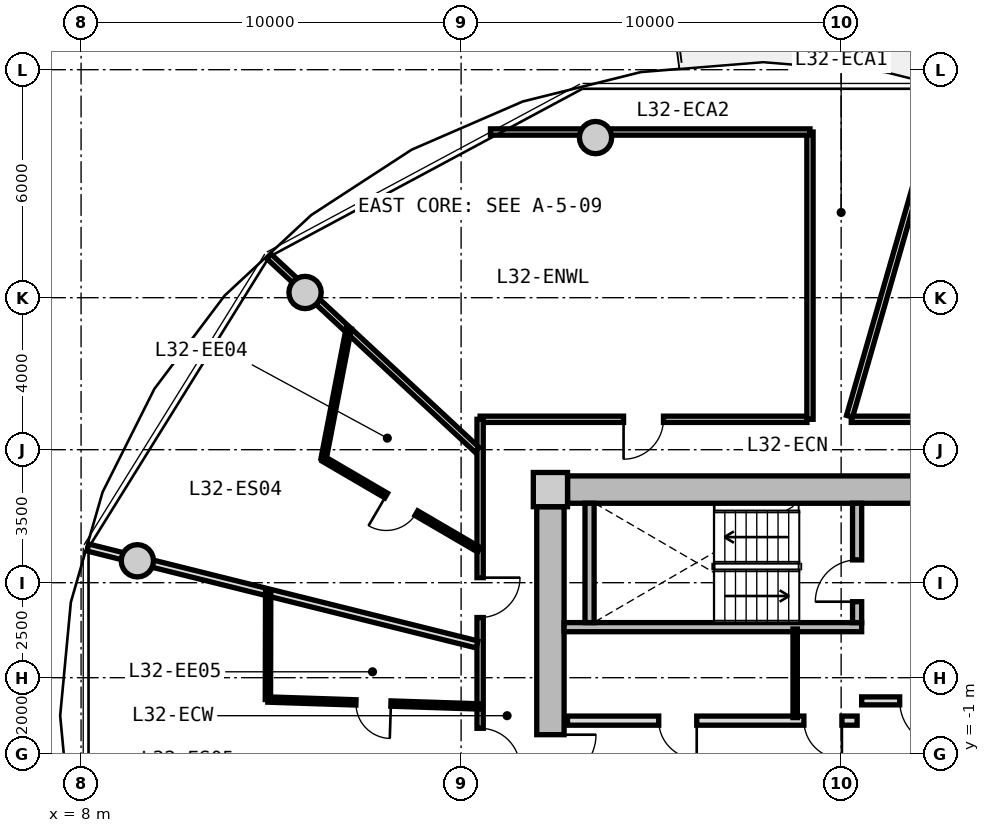
"""IFC4 building model, lengths in metres.
Left out: names, types, materials, properties, quantities, classifications, styles, units other than length and angle.
Written with IfcOpenShell. Run it as: python <this file> out.ifc"""

import sys

from ifc_helpers import new_model, si_unit, direction, frame, frame_2d, origin, origin_2d, place, context, subcontext, project, spatial, rectangle, circle, extrude, source, transform, mapped, element, fill, save


model = new_model("IFC4")
c1 = context("Model", 3, precision=1e-05, world=origin(), true_north=direction((0.0, 1.0)))
c2 = subcontext(c1, "Body", "Model", "MODEL_VIEW")
j1 = project(units=[si_unit("LENGTHUNIT", "METRE"), si_unit("PLANEANGLEUNIT", "RADIAN")], contexts=[c1])
p1 = place(None, origin())
s1 = spatial("IfcSite", under=j1, at=p1, CompositionType="ELEMENT")
p2 = place(p1, origin())
s2 = spatial("IfcBuilding", under=s1, at=p2, CompositionType="ELEMENT")
p3 = place(p2, frame((0.0, 0.0, 105.4)))
s3 = spatial("IfcBuildingStorey", under=s2, at=p3, CompositionType="ELEMENT", Elevation=105.4)
m1 = source(origin(), c2, "Body", "SweptSolid", [
    extrude(rectangle(XDim=0.9, YDim=0.9, at=origin_2d()), origin(), (0.0, 0.0, 1.0), 3.05),
])
p4 = place(p3, frame((20.35, 5.95, 0.0), z_axis=(0.0, 0.0, 1.0), x_axis=(1.0, 0.0, 0.0)))
e1 = element("IfcColumn", 1, at=p4, inside=s3, PredefinedType="COLUMN", context=c2, shape_type="MappedRepresentation", body=[
    mapped(m1, transform((0.0, 0.0, 0.0), x_axis=(1.0, 0.0, 0.0), y_axis=(0.0, 1.0, 0.0), z_axis=(0.0, 0.0, 1.0), scale=1.0)),
])
m2 = source(origin(), c2, "Body", "SweptSolid", [
    extrude(rectangle(XDim=14.4, YDim=0.72, at=frame_2d((7.2, 0.0))), origin(), (0.0, 0.0, 1.0), 2.79),
])
p5 = place(p3, frame((20.8, 5.95, 0.0), z_axis=(0.0, 0.0, 1.0), x_axis=(1.0, 0.0, 0.0)))
e2 = element("IfcWall", 2, at=p5, inside=s3, PredefinedType="SHEAR", context=c2, shape_type="MappedRepresentation", body=[
    mapped(m2, transform((0.0, 0.0, 0.0), x_axis=(1.0, 0.0, 0.0), y_axis=(0.0, 1.0, 0.0), z_axis=(0.0, 0.0, 1.0), scale=1.0)),
])
m3 = source(origin(), c2, "Body", "SweptSolid", [
    extrude(rectangle(XDim=11.0, YDim=0.72, at=frame_2d((5.5, 0.0))), origin(), (0.0, 0.0, 1.0), 2.79),
])
p6 = place(p3, frame((20.35, -5.5, 0.0), z_axis=(0.0, 0.0, 1.0), x_axis=(0.0, 1.0, 0.0)))
e3 = element("IfcWall", 3, at=p6, inside=s3, PredefinedType="SHEAR", context=c2, shape_type="MappedRepresentation", body=[
    mapped(m3, transform((0.0, 0.0, 0.0), x_axis=(1.0, 0.0, 0.0), y_axis=(0.0, 1.0, 0.0), z_axis=(0.0, 0.0, 1.0), scale=1.0)),
])
p7 = place(p6, frame((3.8, 0.0, 0.0)))
e4 = element("IfcOpeningElement", 4, at=p7, cuts=e3, PredefinedType="OPENING", context=c2, shape_type="SweptSolid", body=[
    extrude(rectangle(XDim=1.2, YDim=2.15, at=frame_2d((0.6, 1.075))), frame((0.0, 0.37, 0.0), z_axis=(0.0, -1.0, 0.0), x_axis=(1.0, 0.0, 0.0)), (0.0, 0.0, 1.0), 0.74),
])
m4 = source(origin(), c2, "Body", "SweptSolid", [
    extrude(circle(Radius=0.425, at=origin_2d()), origin(), (0.0, 0.0, 1.0), 3.05),
])
for number, where, z_axis, x_axis in (
    (5, (21.537, 15.213, 0.0), (0.0, 0.0, 1.0), (1.0, 0.0, 0.0)),
    (6, (13.894, 11.137, 0.0), (0.0, 0.0, 1.0), (1.0, 0.0, 0.0)),
    (7, (9.481, 4.076, 0.0), (0.0, 0.0, 1.0), (1.0, 0.0, 0.0)),
):
    element("IfcColumn", number, at=place(p3, frame(where, z_axis=z_axis, x_axis=x_axis)), inside=s3, PredefinedType="COLUMN", context=c2, shape_type="MappedRepresentation", body=[
        mapped(m4, transform((0.0, 0.0, 0.0), x_axis=(1.0, 0.0, 0.0), y_axis=(0.0, 1.0, 0.0), z_axis=(0.0, 0.0, 1.0), scale=1.0)),
    ])
m5 = source(origin(), c2, "Body", "SweptSolid", [
    extrude(rectangle(XDim=7.83, YDim=0.24, at=frame_2d((3.915, 0.0))), origin(), (0.0, 0.0, 1.0), 2.79),
])
p8 = place(p3, frame((20.71, 2.33, 0.0), z_axis=(0.0, 0.0, 1.0), x_axis=(1.0, 0.0, 0.0)))
e8 = element("IfcWall", 8, at=p8, inside=s3, PredefinedType="PARTITIONING", context=c2, shape_type="MappedRepresentation", body=[
    mapped(m5, transform((0.0, 0.0, 0.0), x_axis=(1.0, 0.0, 0.0), y_axis=(0.0, 1.0, 0.0), z_axis=(0.0, 0.0, 1.0), scale=1.0)),
])
m6 = source(origin(), c2, "Body", "SweptSolid", [
    extrude(rectangle(XDim=3.14, YDim=0.24, at=frame_2d((1.57, 0.0))), origin(), (0.0, 0.0, 1.0), 2.79),
])
p9 = place(p3, frame((21.38, 2.45, 0.0), z_axis=(0.0, 0.0, 1.0), x_axis=(0.0, 1.0, 0.0)))
e9 = element("IfcWall", 9, at=p9, inside=s3, PredefinedType="PARTITIONING", context=c2, shape_type="MappedRepresentation", body=[
    mapped(m6, transform((0.0, 0.0, 0.0), x_axis=(1.0, 0.0, 0.0), y_axis=(0.0, 1.0, 0.0), z_axis=(0.0, 0.0, 1.0), scale=1.0)),
])
p10 = place(p3, frame((28.42, 2.45, 0.0), z_axis=(0.0, 0.0, 1.0), x_axis=(0.0, 1.0, 0.0)))
e10 = element("IfcWall", 10, at=p10, inside=s3, PredefinedType="PARTITIONING", context=c2, shape_type="MappedRepresentation", body=[
    mapped(m6, transform((0.0, 0.0, 0.0), x_axis=(1.0, 0.0, 0.0), y_axis=(0.0, 1.0, 0.0), z_axis=(0.0, 0.0, 1.0), scale=1.0)),
])
p11 = place(p10, frame((0.55, 0.0, 0.0)))
e11 = element("IfcOpeningElement", 11, at=p11, cuts=e10, PredefinedType="OPENING", context=c2, shape_type="SweptSolid", body=[
    extrude(rectangle(XDim=1.1, YDim=2.15, at=frame_2d((0.55, 1.075))), frame((0.0, 0.13, 0.0), z_axis=(0.0, -1.0, 0.0), x_axis=(1.0, 0.0, 0.0)), (0.0, 0.0, 1.0), 0.26),
])
m7 = source(origin(), c2, "Body", "SweptSolid", [
    extrude(rectangle(XDim=6.66, YDim=0.21, at=frame_2d((3.33, 0.0))), origin(), (0.0, 0.0, 1.0), 2.775),
])
p12 = place(p3, frame((28.54, 0.39, 0.0), z_axis=(0.0, 0.0, 1.0), x_axis=(1.0, 0.0, 0.0)))
e12 = element("IfcWall", 12, at=p12, inside=s3, PredefinedType="PARTITIONING", context=c2, shape_type="MappedRepresentation", body=[
    mapped(m7, transform((0.0, 0.0, 0.0), x_axis=(1.0, 0.0, 0.0), y_axis=(0.0, 1.0, 0.0), z_axis=(0.0, 0.0, 1.0), scale=1.0)),
])
p13 = place(p12, frame((1.0, 0.0, 0.0)))
e13 = element("IfcOpeningElement", 13, at=p13, cuts=e12, PredefinedType="OPENING", context=c2, shape_type="SweptSolid", body=[
    extrude(rectangle(XDim=1.2, YDim=2.15, at=frame_2d((0.6, 1.075))), frame((0.0, 0.115, 0.0), z_axis=(0.0, -1.0, 0.0), x_axis=(1.0, 0.0, 0.0)), (0.0, 0.0, 1.0), 0.23),
])
m8 = source(origin(), c2, "Body", "SweptSolid", [
    extrude(rectangle(XDim=7.62, YDim=0.24, at=frame_2d((3.81, 0.0))), origin(), (0.0, 0.0, 1.0), 2.775),
])
p14 = place(p3, frame((20.8, -0.13, 0.0), z_axis=(0.0, 0.0, 1.0), x_axis=(1.0, 0.0, 0.0)))
e14 = element("IfcWall", 14, at=p14, inside=s3, PredefinedType="PARTITIONING", context=c2, shape_type="MappedRepresentation", body=[
    mapped(m8, transform((0.0, 0.0, 0.0), x_axis=(1.0, 0.0, 0.0), y_axis=(0.0, 1.0, 0.0), z_axis=(0.0, 0.0, 1.0), scale=1.0)),
])
p15 = place(p14, frame((6.22, 0.0, 0.0)))
e15 = element("IfcOpeningElement", 15, at=p15, cuts=e14, PredefinedType="OPENING", context=c2, shape_type="SweptSolid", body=[
    extrude(rectangle(XDim=1.0, YDim=2.1, at=frame_2d((0.5, 1.05))), frame((0.0, 0.13, 0.0), z_axis=(0.0, -1.0, 0.0), x_axis=(1.0, 0.0, 0.0)), (0.0, 0.0, 1.0), 0.26),
])
p16 = place(p14, frame((2.4, 0.0, 0.0)))
e16 = element("IfcOpeningElement", 16, at=p16, cuts=e14, PredefinedType="OPENING", context=c2, shape_type="SweptSolid", body=[
    extrude(rectangle(XDim=1.0, YDim=2.1, at=frame_2d((0.5, 1.05))), frame((0.0, 0.13, 0.0), z_axis=(0.0, -1.0, 0.0), x_axis=(1.0, 0.0, 0.0)), (0.0, 0.0, 1.0), 0.26),
])
m9 = source(origin(), c2, "Body", "SweptSolid", [
    extrude(rectangle(XDim=2.33, YDim=0.115, at=frame_2d((1.165, 0.0))), origin(), (0.0, 0.0, 1.0), 2.775),
])
p17 = place(p3, frame((26.79, -0.05, 0.0), z_axis=(0.0, 0.0, 1.0), x_axis=(0.0, 1.0, 0.0)))
e17 = element("IfcWall", 17, at=p17, inside=s3, PredefinedType="PARTITIONING", context=c2, shape_type="MappedRepresentation", body=[
    mapped(m9, transform((0.0, 0.0, 0.0), x_axis=(1.0, 0.0, 0.0), y_axis=(0.0, 1.0, 0.0), z_axis=(0.0, 0.0, 1.0), scale=1.0)),
])
m10 = source(origin(), c2, "Body", "SweptSolid", [
    extrude(rectangle(XDim=8.6, YDim=0.165, at=frame_2d((4.3, 0.0))), origin(), (0.0, 0.0, 1.0), 2.775),
])
p18 = place(p3, frame((18.5, 7.8, 0.0), z_axis=(0.0, 0.0, 1.0), x_axis=(1.0, 0.0, 0.0)))
e18 = element("IfcWall", 18, at=p18, inside=s3, PredefinedType="PARTITIONING", context=c2, shape_type="MappedRepresentation", body=[
    mapped(m10, transform((0.0, 0.0, 0.0), x_axis=(1.0, 0.0, 0.0), y_axis=(0.0, 1.0, 0.0), z_axis=(0.0, 0.0, 1.0), scale=1.0)),
])
p19 = place(p18, frame((3.775, 0.0, 0.0)))
e19 = element("IfcOpeningElement", 19, at=p19, cuts=e18, PredefinedType="OPENING", context=c2, shape_type="SweptSolid", body=[
    extrude(rectangle(XDim=1.05, YDim=2.15, at=frame_2d((0.525, 1.075))), frame((0.0, 0.093, 0.0), z_axis=(0.0, -1.0, 0.0), x_axis=(1.0, 0.0, 0.0)), (0.0, 0.0, 1.0), 0.185),
])
m11 = source(origin(), c2, "Body", "SweptSolid", [
    extrude(rectangle(XDim=9.234, YDim=0.165, at=frame_2d((4.617, 0.0))), origin(), (0.0, 0.0, 1.0), 2.775),
])
p20 = place(p3, frame((28.266, 7.8, 0.0), z_axis=(0.0, 0.0, 1.0), x_axis=(1.0, 0.0, 0.0)))
e20 = element("IfcWall", 20, at=p20, inside=s3, PredefinedType="PARTITIONING", context=c2, shape_type="MappedRepresentation", body=[
    mapped(m11, transform((0.0, 0.0, 0.0), x_axis=(1.0, 0.0, 0.0), y_axis=(0.0, 1.0, 0.0), z_axis=(0.0, 0.0, 1.0), scale=1.0)),
])
p21 = place(p20, frame((2.588, 0.0, 0.0)))
e21 = element("IfcOpeningElement", 21, at=p21, cuts=e20, PredefinedType="OPENING", context=c2, shape_type="SweptSolid", body=[
    extrude(rectangle(XDim=1.25, YDim=2.2, at=frame_2d((0.625, 1.1))), frame((0.0, 0.093, 0.0), z_axis=(0.0, -1.0, 0.0), x_axis=(1.0, 0.0, 0.0)), (0.0, 0.0, 1.0), 0.185),
])
m12 = source(origin(), c2, "Body", "SweptSolid", [
    extrude(rectangle(XDim=15.6, YDim=0.165, at=frame_2d((7.8, 0.0))), origin(), (0.0, 0.0, 1.0), 2.775),
])
p22 = place(p3, frame((18.5, -7.8, 0.0), z_axis=(0.0, 0.0, 1.0), x_axis=(0.0, 1.0, 0.0)))
e22 = element("IfcWall", 22, at=p22, inside=s3, PredefinedType="PARTITIONING", context=c2, shape_type="MappedRepresentation", body=[
    mapped(m12, transform((0.0, 0.0, 0.0), x_axis=(1.0, 0.0, 0.0), y_axis=(0.0, 1.0, 0.0), z_axis=(0.0, 0.0, 1.0), scale=1.0)),
])
p23 = place(p22, frame((10.383, 0.0, 0.0)))
e23 = element("IfcOpeningElement", 23, at=p23, cuts=e22, PredefinedType="OPENING", context=c2, shape_type="SweptSolid", body=[
    extrude(rectangle(XDim=1.05, YDim=2.15, at=frame_2d((0.525, 1.075))), frame((0.0, 0.093, 0.0), z_axis=(0.0, -1.0, 0.0), x_axis=(1.0, 0.0, 0.0)), (0.0, 0.0, 1.0), 0.185),
])
p24 = place(p22, frame((6.419, 0.0, 0.0)))
e24 = element("IfcOpeningElement", 24, at=p24, cuts=e22, PredefinedType="OPENING", context=c2, shape_type="SweptSolid", body=[
    extrude(rectangle(XDim=1.05, YDim=2.15, at=frame_2d((0.525, 1.075))), frame((0.0, 0.093, 0.0), z_axis=(0.0, -1.0, 0.0), x_axis=(1.0, 0.0, 0.0)), (0.0, 0.0, 1.0), 0.185),
])
p25 = place(p22, frame((1.821, 0.0, 0.0)))
e25 = element("IfcOpeningElement", 25, at=p25, cuts=e22, PredefinedType="OPENING", context=c2, shape_type="SweptSolid", body=[
    extrude(rectangle(XDim=1.05, YDim=2.15, at=frame_2d((0.525, 1.075))), frame((0.0, 0.093, 0.0), z_axis=(0.0, -1.0, 0.0), x_axis=(1.0, 0.0, 0.0)), (0.0, 0.0, 1.0), 0.185),
])
m13 = source(origin(), c2, "Body", "SweptSolid", [
    extrude(rectangle(XDim=8.989, YDim=0.165, at=frame_2d((4.495, 0.0))), origin(), (0.0, 0.0, 1.0), 2.275),
])
p26 = place(p3, frame((28.222, 7.88, 0.0), z_axis=(0.0, 0.0, 1.0), x_axis=(0.27702323008, 0.960863221274, 0.0)))
e26 = element("IfcWall", 26, at=p26, inside=s3, PredefinedType="PARTITIONING", context=c2, shape_type="MappedRepresentation", body=[
    mapped(m13, transform((0.0, 0.0, 0.0), x_axis=(1.0, 0.0, 0.0), y_axis=(0.0, 1.0, 0.0), z_axis=(0.0, 0.0, 1.0), scale=1.0)),
])
m14 = source(origin(), c2, "Body", "SweptSolid", [
    extrude(rectangle(XDim=7.482, YDim=0.165, at=frame_2d((3.741, 0.0))), origin(), (0.0, 0.0, 1.0), 2.275),
])
p27 = place(p3, frame((18.42, 6.998, 0.0), z_axis=(0.0, 0.0, 1.0), x_axis=(-0.732508698043, 0.680757671489, 0.0)))
e27 = element("IfcWall", 27, at=p27, inside=s3, PredefinedType="PARTITIONING", context=c2, shape_type="MappedRepresentation", body=[
    mapped(m14, transform((0.0, 0.0, 0.0), x_axis=(1.0, 0.0, 0.0), y_axis=(0.0, 1.0, 0.0), z_axis=(0.0, 0.0, 1.0), scale=1.0)),
])
m15 = source(origin(), c2, "Body", "SweptSolid", [
    extrude(rectangle(XDim=7.56, YDim=0.165, at=frame_2d((3.78, 0.0))), origin(), (0.0, 0.0, 1.0), 2.775),
])
p28 = place(p3, frame((27.18, 7.8, 0.0), z_axis=(0.0, 0.0, 1.0), x_axis=(0.0, 1.0, 0.0)))
e28 = element("IfcWall", 28, at=p28, inside=s3, PredefinedType="PARTITIONING", context=c2, shape_type="MappedRepresentation", body=[
    mapped(m15, transform((0.0, 0.0, 0.0), x_axis=(1.0, 0.0, 0.0), y_axis=(0.0, 1.0, 0.0), z_axis=(0.0, 0.0, 1.0), scale=1.0)),
])
m16 = source(origin(), c2, "Body", "SweptSolid", [
    extrude(rectangle(XDim=8.407, YDim=0.165, at=frame_2d((4.204, 0.0))), origin(), (0.0, 0.0, 1.0), 2.275),
])
p29 = place(p3, frame((18.773, 15.36, 0.0), z_axis=(0.0, 0.0, 1.0), x_axis=(1.0, 0.0, 0.0)))
e29 = element("IfcWall", 29, at=p29, inside=s3, PredefinedType="PARTITIONING", context=c2, shape_type="MappedRepresentation", body=[
    mapped(m16, transform((0.0, 0.0, 0.0), x_axis=(1.0, 0.0, 0.0), y_axis=(0.0, 1.0, 0.0), z_axis=(0.0, 0.0, 1.0), scale=1.0)),
])
m17 = source(origin(), c2, "Body", "SweptSolid", [
    extrude(rectangle(XDim=10.556, YDim=0.19, at=frame_2d((5.278, 0.0))), origin(), (0.0, 0.0, 1.0), 2.275),
])
p30 = place(p3, frame((18.42, 1.875, 0.0), z_axis=(0.0, 0.0, 1.0), x_axis=(-0.970363857851, 0.241648470667, 0.0)))
e30 = element("IfcWall", 30, at=p30, inside=s3, PredefinedType="PARTITIONING", context=c2, shape_type="MappedRepresentation", body=[
    mapped(m17, transform((0.0, 0.0, 0.0), x_axis=(1.0, 0.0, 0.0), y_axis=(0.0, 1.0, 0.0), z_axis=(0.0, 0.0, 1.0), scale=1.0)),
])
m18 = source(origin(), c2, "Body", "SweptSolid", [
    extrude(rectangle(XDim=4.735, YDim=0.14, at=frame_2d((2.368, 0.0))), origin(), (0.0, 0.0, 1.0), 2.775),
])
p31 = place(p3, frame((18.47, 4.368, 0.0), z_axis=(0.0, 0.0, 1.0), x_axis=(-0.863537576642, 0.504284496814, 0.0)))
e31 = element("IfcWall", 31, at=p31, inside=s3, PredefinedType="PARTITIONING", context=c2, shape_type="MappedRepresentation", body=[
    mapped(m18, transform((0.0, 0.0, 0.0), x_axis=(1.0, 0.0, 0.0), y_axis=(0.0, 1.0, 0.0), z_axis=(0.0, 0.0, 1.0), scale=1.0)),
])
p32 = place(p31, frame((1.908, 0.0, 0.0)))
e32 = element("IfcOpeningElement", 32, at=p32, cuts=e31, PredefinedType="OPENING", context=c2, shape_type="SweptSolid", body=[
    extrude(rectangle(XDim=0.92, YDim=2.1, at=frame_2d((0.46, 1.05))), frame((0.0, 0.08, 0.0), z_axis=(0.0, -1.0, 0.0), x_axis=(1.0, 0.0, 0.0)), (0.0, 0.0, 1.0), 0.16),
])
m19 = source(origin(), c2, "Body", "SweptSolid", [
    extrude(rectangle(XDim=3.499, YDim=0.14, at=frame_2d((1.75, 0.0))), origin(), (0.0, 0.0, 1.0), 2.775),
])
p33 = place(p3, frame((14.381, 6.756, 0.0), z_axis=(0.0, 0.0, 1.0), x_axis=(0.18957713629, 0.981865830649, 0.0)))
e33 = element("IfcWall", 33, at=p33, inside=s3, PredefinedType="PARTITIONING", context=c2, shape_type="MappedRepresentation", body=[
    mapped(m19, transform((0.0, 0.0, 0.0), x_axis=(1.0, 0.0, 0.0), y_axis=(0.0, 1.0, 0.0), z_axis=(0.0, 0.0, 1.0), scale=1.0)),
])
m20 = source(origin(), c2, "Body", "SweptSolid", [
    extrude(rectangle(XDim=5.557, YDim=0.14, at=frame_2d((2.778, 0.0))), origin(), (0.0, 0.0, 1.0), 2.775),
])
p34 = place(p3, frame((18.47, 0.244, 0.0), z_axis=(0.0, 0.0, 1.0), x_axis=(-0.999468495627, 0.03259948234, 0.0)))
e34 = element("IfcWall", 34, at=p34, inside=s3, PredefinedType="PARTITIONING", context=c2, shape_type="MappedRepresentation", body=[
    mapped(m20, transform((0.0, 0.0, 0.0), x_axis=(1.0, 0.0, 0.0), y_axis=(0.0, 1.0, 0.0), z_axis=(0.0, 0.0, 1.0), scale=1.0)),
])
p35 = place(p34, frame((2.318, 0.0, 0.0)))
e35 = element("IfcOpeningElement", 35, at=p35, cuts=e34, PredefinedType="OPENING", context=c2, shape_type="SweptSolid", body=[
    extrude(rectangle(XDim=0.92, YDim=2.1, at=frame_2d((0.46, 1.05))), frame((0.0, 0.08, 0.0), z_axis=(0.0, -1.0, 0.0), x_axis=(1.0, 0.0, 0.0)), (0.0, 0.0, 1.0), 0.16),
])
m21 = source(origin(), c2, "Body", "SweptSolid", [
    extrude(rectangle(XDim=2.837, YDim=0.14, at=frame_2d((1.418, 0.0))), origin(), (0.0, 0.0, 1.0), 2.775),
])
p36 = place(p3, frame((12.916, 0.425, 0.0), z_axis=(0.0, 0.0, 1.0), x_axis=(0.002409838945, 0.999997096334, 0.0)))
e36 = element("IfcWall", 36, at=p36, inside=s3, PredefinedType="PARTITIONING", context=c2, shape_type="MappedRepresentation", body=[
    mapped(m21, transform((0.0, 0.0, 0.0), x_axis=(1.0, 0.0, 0.0), y_axis=(0.0, 1.0, 0.0), z_axis=(0.0, 0.0, 1.0), scale=1.0)),
])
m22 = source(origin(), c2, "Body", "SweptSolid", [
    extrude(rectangle(XDim=1.1, YDim=2.15, at=frame_2d((0.55, 1.075))), frame((0.0, 0.025, 0.0), z_axis=(0.0, -1.0, 0.0), x_axis=(1.0, 0.0, 0.0)), (0.0, 0.0, 1.0), 0.05),
])
p37 = place(p11, origin())
e37 = element("IfcDoor", 37, at=p37, inside=s3, OperationType="SINGLE_SWING_LEFT", PredefinedType="DOOR", context=c2, shape_type="MappedRepresentation", body=[
    mapped(m22, transform((0.0, 0.0, 0.0), x_axis=(1.0, 0.0, 0.0), y_axis=(0.0, 1.0, 0.0), z_axis=(0.0, 0.0, 1.0), scale=1.0)),
])
fill(e11, e37)
m23 = source(origin(), c2, "Body", "SweptSolid", [
    extrude(rectangle(XDim=1.2, YDim=2.15, at=frame_2d((0.6, 1.075))), frame((0.0, 0.025, 0.0), z_axis=(0.0, -1.0, 0.0), x_axis=(1.0, 0.0, 0.0)), (0.0, 0.0, 1.0), 0.05),
])
p38 = place(p13, frame((1.2, 0.0, 0.0), z_axis=(0.0, 0.0, 1.0), x_axis=(-1.0, 0.0, 0.0)))
e38 = element("IfcDoor", 38, at=p38, inside=s3, OperationType="SINGLE_SWING_LEFT", PredefinedType="DOOR", context=c2, shape_type="MappedRepresentation", body=[
    mapped(m23, transform((0.0, 0.0, 0.0), x_axis=(1.0, 0.0, 0.0), y_axis=(0.0, 1.0, 0.0), z_axis=(0.0, 0.0, 1.0), scale=1.0)),
])
fill(e13, e38)
p39 = place(p7, frame((1.2, 0.0, 0.0), z_axis=(0.0, 0.0, 1.0), x_axis=(-1.0, 0.0, 0.0)))
e39 = element("IfcDoor", 39, at=p39, inside=s3, OperationType="SINGLE_SWING_LEFT", PredefinedType="DOOR", context=c2, shape_type="MappedRepresentation", body=[
    mapped(m23, transform((0.0, 0.0, 0.0), x_axis=(1.0, 0.0, 0.0), y_axis=(0.0, 1.0, 0.0), z_axis=(0.0, 0.0, 1.0), scale=1.0)),
])
fill(e4, e39)
m24 = source(origin(), c2, "Body", "SweptSolid", [
    extrude(rectangle(XDim=1.0, YDim=2.1, at=frame_2d((0.5, 1.05))), frame((0.0, 0.025, 0.0), z_axis=(0.0, -1.0, 0.0), x_axis=(1.0, 0.0, 0.0)), (0.0, 0.0, 1.0), 0.05),
])
p40 = place(p15, frame((1.0, 0.0, 0.0), z_axis=(0.0, 0.0, 1.0), x_axis=(-1.0, 0.0, 0.0)))
e40 = element("IfcDoor", 40, at=p40, inside=s3, OperationType="SINGLE_SWING_LEFT", PredefinedType="DOOR", context=c2, shape_type="MappedRepresentation", body=[
    mapped(m24, transform((0.0, 0.0, 0.0), x_axis=(1.0, 0.0, 0.0), y_axis=(0.0, 1.0, 0.0), z_axis=(0.0, 0.0, 1.0), scale=1.0)),
])
fill(e15, e40)
p41 = place(p16, frame((1.0, 0.0, 0.0), z_axis=(0.0, 0.0, 1.0), x_axis=(-1.0, 0.0, 0.0)))
e41 = element("IfcDoor", 41, at=p41, inside=s3, OperationType="SINGLE_SWING_LEFT", PredefinedType="DOOR", context=c2, shape_type="MappedRepresentation", body=[
    mapped(m24, transform((0.0, 0.0, 0.0), x_axis=(1.0, 0.0, 0.0), y_axis=(0.0, 1.0, 0.0), z_axis=(0.0, 0.0, 1.0), scale=1.0)),
])
fill(e16, e41)
m25 = source(origin(), c2, "Body", "SweptSolid", [
    extrude(rectangle(XDim=1.05, YDim=2.15, at=frame_2d((0.525, 1.075))), frame((0.0, 0.025, 0.0), z_axis=(0.0, -1.0, 0.0), x_axis=(1.0, 0.0, 0.0)), (0.0, 0.0, 1.0), 0.05),
])
p42 = place(p19, frame((1.05, 0.0, 0.0), z_axis=(0.0, 0.0, 1.0), x_axis=(-1.0, 0.0, 0.0)))
e42 = element("IfcDoor", 42, at=p42, inside=s3, OperationType="SINGLE_SWING_RIGHT", PredefinedType="DOOR", context=c2, shape_type="MappedRepresentation", body=[
    mapped(m25, transform((0.0, 0.0, 0.0), x_axis=(1.0, 0.0, 0.0), y_axis=(0.0, 1.0, 0.0), z_axis=(0.0, 0.0, 1.0), scale=1.0)),
])
fill(e19, e42)
p43 = place(p23, frame((1.05, 0.0, 0.0), z_axis=(0.0, 0.0, 1.0), x_axis=(-1.0, 0.0, 0.0)))
e43 = element("IfcDoor", 43, at=p43, inside=s3, OperationType="SINGLE_SWING_LEFT", PredefinedType="DOOR", context=c2, shape_type="MappedRepresentation", body=[
    mapped(m25, transform((0.0, 0.0, 0.0), x_axis=(1.0, 0.0, 0.0), y_axis=(0.0, 1.0, 0.0), z_axis=(0.0, 0.0, 1.0), scale=1.0)),
])
fill(e23, e43)
m26 = source(origin(), c2, "Body", "SweptSolid", [
    extrude(rectangle(XDim=0.92, YDim=2.1, at=frame_2d((0.46, 1.05))), frame((0.0, 0.025, 0.0), z_axis=(0.0, -1.0, 0.0), x_axis=(1.0, 0.0, 0.0)), (0.0, 0.0, 1.0), 0.05),
])
p44 = place(p32, origin())
e44 = element("IfcDoor", 44, at=p44, inside=s3, OperationType="SINGLE_SWING_RIGHT", PredefinedType="DOOR", context=c2, shape_type="MappedRepresentation", body=[
    mapped(m26, transform((0.0, 0.0, 0.0), x_axis=(1.0, 0.0, 0.0), y_axis=(0.0, 1.0, 0.0), z_axis=(0.0, 0.0, 1.0), scale=1.0)),
])
fill(e32, e44)
p45 = place(p24, frame((1.05, 0.0, 0.0), z_axis=(0.0, 0.0, 1.0), x_axis=(-1.0, 0.0, 0.0)))
e45 = element("IfcDoor", 45, at=p45, inside=s3, OperationType="SINGLE_SWING_RIGHT", PredefinedType="DOOR", context=c2, shape_type="MappedRepresentation", body=[
    mapped(m25, transform((0.0, 0.0, 0.0), x_axis=(1.0, 0.0, 0.0), y_axis=(0.0, 1.0, 0.0), z_axis=(0.0, 0.0, 1.0), scale=1.0)),
])
fill(e24, e45)
p46 = place(p35, origin())
e46 = element("IfcDoor", 46, at=p46, inside=s3, OperationType="SINGLE_SWING_LEFT", PredefinedType="DOOR", context=c2, shape_type="MappedRepresentation", body=[
    mapped(m26, transform((0.0, 0.0, 0.0), x_axis=(1.0, 0.0, 0.0), y_axis=(0.0, 1.0, 0.0), z_axis=(0.0, 0.0, 1.0), scale=1.0)),
])
fill(e35, e46)
save(model, sys.argv[1])
